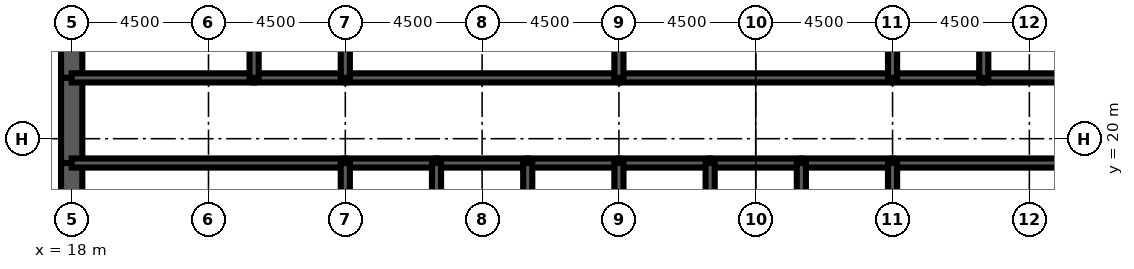
"""IFC4 building model, lengths in metres.
Left out: names, types, materials, properties, quantities, classifications, styles, units other than length and angle.
Written with IfcOpenShell. Run it as: python <this file> out.ifc"""

import sys

from ifc_helpers import new_model, si_unit, direction, frame, frame_2d, origin, place, context, subcontext, project, spatial, rectangle, extrude, element, fill, save


model = new_model("IFC4")
c1 = context("Model", 3, precision=1e-05, world=origin(), true_north=direction((0.0, 1.0)))
c2 = subcontext(c1, "Body", "Model", "MODEL_VIEW")
j1 = project(units=[si_unit("LENGTHUNIT", "METRE"), si_unit("PLANEANGLEUNIT", "RADIAN")], contexts=[c1])
p1 = place(None, origin())
s1 = spatial("IfcSite", under=j1, at=p1, CompositionType="ELEMENT")
p2 = place(p1, origin())
s2 = spatial("IfcBuilding", under=s1, at=p2, CompositionType="ELEMENT")
p3 = place(p2, frame((0.0, 0.0, 317.3)))
s3 = spatial("IfcBuildingStorey", under=s2, at=p3, CompositionType="ELEMENT", Elevation=317.3)
p4 = place(p3, frame((18.0, 26.0, 0.0), z_axis=(0.0, 0.0, 1.0), x_axis=(0.0, -1.0, 0.0)))
e1 = element("IfcWall", 1, at=p4, inside=s3, PredefinedType="SHEAR", context=c2, shape_type="SweptSolid", body=[
    extrude(rectangle(XDim=4.0, YDim=0.7, at=frame_2d((2.0, 0.0))), origin(), (0.0, 0.0, 1.0), 4.2),
])
p5 = place(p3, frame((18.0, 22.0, 0.0), z_axis=(0.0, 0.0, 1.0), x_axis=(0.0, -1.0, 0.0)))
e2 = element("IfcWall", 2, at=p5, inside=s3, PredefinedType="SHEAR", context=c2, shape_type="SweptSolid", body=[
    extrude(rectangle(XDim=2.8, YDim=0.7, at=frame_2d((1.4, 0.0))), origin(), (0.0, 0.0, 1.0), 4.2),
])
p6 = place(p5, frame((0.6, 0.0, 0.0)))
e3 = element("IfcOpeningElement", 3, at=p6, cuts=e2, PredefinedType="OPENING", context=c2, shape_type="SweptSolid", body=[
    extrude(rectangle(XDim=1.8, YDim=2.1, at=frame_2d((0.9, 1.05))), frame((0.0, 0.36, 0.0), z_axis=(0.0, -1.0, 0.0), x_axis=(1.0, 0.0, 0.0)), (0.0, 0.0, 1.0), 0.72),
])
p7 = place(p3, frame((18.0, 19.2, 0.0), z_axis=(0.0, 0.0, 1.0), x_axis=(0.0, -1.0, 0.0)))
e4 = element("IfcWall", 4, at=p7, inside=s3, PredefinedType="SHEAR", context=c2, shape_type="SweptSolid", body=[
    extrude(rectangle(XDim=3.2, YDim=0.7, at=frame_2d((1.6, 0.0))), origin(), (0.0, 0.0, 1.0), 4.2),
])
p8 = place(p3, frame((18.0, 19.2, 0.0), z_axis=(0.0, 0.0, 1.0), x_axis=(1.0, 0.0, 0.0)))
e5 = element("IfcWall", 5, at=p8, inside=s3, PredefinedType="SOLIDWALL", context=c2, shape_type="SweptSolid", body=[
    extrude(rectangle(XDim=9.0, YDim=0.3, at=frame_2d((4.5, 0.0))), origin(), (0.0, 0.0, 1.0), 4.2),
])
p9 = place(p8, frame((0.65, 0.0, 0.0)))
e6 = element("IfcOpeningElement", 6, at=p9, cuts=e5, PredefinedType="OPENING", context=c2, shape_type="SweptSolid", body=[
    extrude(rectangle(XDim=1.0, YDim=2.1, at=frame_2d((0.5, 1.05))), frame((0.0, 0.16, 0.0), z_axis=(0.0, -1.0, 0.0), x_axis=(1.0, 0.0, 0.0)), (0.0, 0.0, 1.0), 0.32),
])
p10 = place(p3, frame((27.0, 19.2, 0.0), z_axis=(0.0, 0.0, 1.0), x_axis=(1.0, 0.0, 0.0)))
e7 = element("IfcWall", 7, at=p10, inside=s3, PredefinedType="SOLIDWALL", context=c2, shape_type="SweptSolid", body=[
    extrude(rectangle(XDim=3.0, YDim=0.3, at=frame_2d((1.5, 0.0))), origin(), (0.0, 0.0, 1.0), 4.2),
])
p11 = place(p10, frame((0.95, 0.0, 0.0)))
e8 = element("IfcOpeningElement", 8, at=p11, cuts=e7, PredefinedType="OPENING", context=c2, shape_type="SweptSolid", body=[
    extrude(rectangle(XDim=1.1, YDim=2.2, at=frame_2d((0.55, 1.1))), frame((0.0, 0.16, 0.0), z_axis=(0.0, -1.0, 0.0), x_axis=(1.0, 0.0, 0.0)), (0.0, 0.0, 1.0), 0.32),
])
p12 = place(p3, frame((30.0, 19.2, 0.0), z_axis=(0.0, 0.0, 1.0), x_axis=(1.0, 0.0, 0.0)))
e9 = element("IfcWall", 9, at=p12, inside=s3, PredefinedType="SOLIDWALL", context=c2, shape_type="SweptSolid", body=[
    extrude(rectangle(XDim=3.0, YDim=0.3, at=frame_2d((1.5, 0.0))), origin(), (0.0, 0.0, 1.0), 4.2),
])
p13 = place(p12, frame((0.95, 0.0, 0.0)))
e10 = element("IfcOpeningElement", 10, at=p13, cuts=e9, PredefinedType="OPENING", context=c2, shape_type="SweptSolid", body=[
    extrude(rectangle(XDim=1.1, YDim=2.2, at=frame_2d((0.55, 1.1))), frame((0.0, 0.16, 0.0), z_axis=(0.0, -1.0, 0.0), x_axis=(1.0, 0.0, 0.0)), (0.0, 0.0, 1.0), 0.32),
])
p14 = place(p3, frame((33.0, 19.2, 0.0), z_axis=(0.0, 0.0, 1.0), x_axis=(1.0, 0.0, 0.0)))
e11 = element("IfcWall", 11, at=p14, inside=s3, PredefinedType="SOLIDWALL", context=c2, shape_type="SweptSolid", body=[
    extrude(rectangle(XDim=3.0, YDim=0.3, at=frame_2d((1.5, 0.0))), origin(), (0.0, 0.0, 1.0), 4.2),
])
p15 = place(p14, frame((0.95, 0.0, 0.0)))
e12 = element("IfcOpeningElement", 12, at=p15, cuts=e11, PredefinedType="OPENING", context=c2, shape_type="SweptSolid", body=[
    extrude(rectangle(XDim=1.1, YDim=2.2, at=frame_2d((0.55, 1.1))), frame((0.0, 0.16, 0.0), z_axis=(0.0, -1.0, 0.0), x_axis=(1.0, 0.0, 0.0)), (0.0, 0.0, 1.0), 0.32),
])
p16 = place(p3, frame((36.0, 19.2, 0.0), z_axis=(0.0, 0.0, 1.0), x_axis=(1.0, 0.0, 0.0)))
e13 = element("IfcWall", 13, at=p16, inside=s3, PredefinedType="SOLIDWALL", context=c2, shape_type="SweptSolid", body=[
    extrude(rectangle(XDim=3.0, YDim=0.3, at=frame_2d((1.5, 0.0))), origin(), (0.0, 0.0, 1.0), 4.2),
])
p17 = place(p16, frame((0.95, 0.0, 0.0)))
e14 = element("IfcOpeningElement", 14, at=p17, cuts=e13, PredefinedType="OPENING", context=c2, shape_type="SweptSolid", body=[
    extrude(rectangle(XDim=1.1, YDim=2.2, at=frame_2d((0.55, 1.1))), frame((0.0, 0.16, 0.0), z_axis=(0.0, -1.0, 0.0), x_axis=(1.0, 0.0, 0.0)), (0.0, 0.0, 1.0), 0.32),
])
p18 = place(p3, frame((39.0, 19.2, 0.0), z_axis=(0.0, 0.0, 1.0), x_axis=(1.0, 0.0, 0.0)))
e15 = element("IfcWall", 15, at=p18, inside=s3, PredefinedType="SOLIDWALL", context=c2, shape_type="SweptSolid", body=[
    extrude(rectangle(XDim=3.0, YDim=0.3, at=frame_2d((1.5, 0.0))), origin(), (0.0, 0.0, 1.0), 4.2),
])
p19 = place(p18, frame((1.0, 0.0, 0.0)))
e16 = element("IfcOpeningElement", 16, at=p19, cuts=e15, PredefinedType="OPENING", context=c2, shape_type="SweptSolid", body=[
    extrude(rectangle(XDim=1.0, YDim=2.1, at=frame_2d((0.5, 1.05))), frame((0.0, 0.16, 0.0), z_axis=(0.0, -1.0, 0.0), x_axis=(1.0, 0.0, 0.0)), (0.0, 0.0, 1.0), 0.32),
])
p20 = place(p3, frame((42.0, 19.2, 0.0), z_axis=(0.0, 0.0, 1.0), x_axis=(1.0, 0.0, 0.0)))
e17 = element("IfcWall", 17, at=p20, inside=s3, PredefinedType="SOLIDWALL", context=c2, shape_type="SweptSolid", body=[
    extrude(rectangle(XDim=3.0, YDim=0.3, at=frame_2d((1.5, 0.0))), origin(), (0.0, 0.0, 1.0), 4.2),
])
p21 = place(p20, frame((1.0, 0.0, 0.0)))
e18 = element("IfcOpeningElement", 18, at=p21, cuts=e17, PredefinedType="OPENING", context=c2, shape_type="SweptSolid", body=[
    extrude(rectangle(XDim=1.0, YDim=2.1, at=frame_2d((0.5, 1.05))), frame((0.0, 0.16, 0.0), z_axis=(0.0, -1.0, 0.0), x_axis=(1.0, 0.0, 0.0)), (0.0, 0.0, 1.0), 0.32),
])
p22 = place(p3, frame((45.0, 19.2, 0.0), z_axis=(0.0, 0.0, 1.0), x_axis=(1.0, 0.0, 0.0)))
e19 = element("IfcWall", 19, at=p22, inside=s3, PredefinedType="SOLIDWALL", context=c2, shape_type="SweptSolid", body=[
    extrude(rectangle(XDim=9.0, YDim=0.3, at=frame_2d((4.5, 0.0))), origin(), (0.0, 0.0, 1.0), 4.2),
])
p23 = place(p22, frame((7.35, 0.0, 0.0)))
e20 = element("IfcOpeningElement", 20, at=p23, cuts=e19, PredefinedType="OPENING", context=c2, shape_type="SweptSolid", body=[
    extrude(rectangle(XDim=1.0, YDim=2.1, at=frame_2d((0.5, 1.05))), frame((0.0, 0.16, 0.0), z_axis=(0.0, -1.0, 0.0), x_axis=(1.0, 0.0, 0.0)), (0.0, 0.0, 1.0), 0.32),
])
p24 = place(p3, frame((18.0, 22.0, 0.0), z_axis=(0.0, 0.0, 1.0), x_axis=(1.0, 0.0, 0.0)))
e21 = element("IfcWall", 21, at=p24, inside=s3, PredefinedType="SOLIDWALL", context=c2, shape_type="SweptSolid", body=[
    extrude(rectangle(XDim=6.0, YDim=0.3, at=frame_2d((3.0, 0.0))), origin(), (0.0, 0.0, 1.0), 4.2),
])
p25 = place(p24, frame((4.4, 0.0, 0.0)))
e22 = element("IfcOpeningElement", 22, at=p25, cuts=e21, PredefinedType="OPENING", context=c2, shape_type="SweptSolid", body=[
    extrude(rectangle(XDim=1.0, YDim=2.1, at=frame_2d((0.5, 1.05))), frame((0.0, 0.16, 0.0), z_axis=(0.0, -1.0, 0.0), x_axis=(1.0, 0.0, 0.0)), (0.0, 0.0, 1.0), 0.32),
])
p26 = place(p24, frame((0.9, 0.0, 0.0)))
e23 = element("IfcOpeningElement", 23, at=p26, cuts=e21, PredefinedType="OPENING", context=c2, shape_type="SweptSolid", body=[
    extrude(rectangle(XDim=1.0, YDim=2.1, at=frame_2d((0.5, 1.05))), frame((0.0, 0.16, 0.0), z_axis=(0.0, -1.0, 0.0), x_axis=(1.0, 0.0, 0.0)), (0.0, 0.0, 1.0), 0.32),
])
p27 = place(p3, frame((24.0, 22.0, 0.0), z_axis=(0.0, 0.0, 1.0), x_axis=(1.0, 0.0, 0.0)))
e24 = element("IfcWall", 24, at=p27, inside=s3, PredefinedType="SOLIDWALL", context=c2, shape_type="SweptSolid", body=[
    extrude(rectangle(XDim=3.0, YDim=0.3, at=frame_2d((1.5, 0.0))), origin(), (0.0, 0.0, 1.0), 4.2),
])
p28 = place(p27, frame((1.0, 0.0, 0.0)))
e25 = element("IfcOpeningElement", 25, at=p28, cuts=e24, PredefinedType="OPENING", context=c2, shape_type="SweptSolid", body=[
    extrude(rectangle(XDim=1.0, YDim=2.1, at=frame_2d((0.5, 1.05))), frame((0.0, 0.16, 0.0), z_axis=(0.0, -1.0, 0.0), x_axis=(1.0, 0.0, 0.0)), (0.0, 0.0, 1.0), 0.32),
])
p29 = place(p3, frame((27.0, 22.0, 0.0), z_axis=(0.0, 0.0, 1.0), x_axis=(1.0, 0.0, 0.0)))
e26 = element("IfcWall", 26, at=p29, inside=s3, PredefinedType="SOLIDWALL", context=c2, shape_type="SweptSolid", body=[
    extrude(rectangle(XDim=9.0, YDim=0.3, at=frame_2d((4.5, 0.0))), origin(), (0.0, 0.0, 1.0), 4.2),
])
p30 = place(p29, frame((4.0, 0.0, 0.0)))
e27 = element("IfcOpeningElement", 27, at=p30, cuts=e26, PredefinedType="OPENING", context=c2, shape_type="SweptSolid", body=[
    extrude(rectangle(XDim=1.0, YDim=2.1, at=frame_2d((0.5, 1.05))), frame((0.0, 0.16, 0.0), z_axis=(0.0, -1.0, 0.0), x_axis=(1.0, 0.0, 0.0)), (0.0, 0.0, 1.0), 0.32),
])
p31 = place(p3, frame((36.0, 22.0, 0.0), z_axis=(0.0, 0.0, 1.0), x_axis=(1.0, 0.0, 0.0)))
e28 = element("IfcWall", 28, at=p31, inside=s3, PredefinedType="SOLIDWALL", context=c2, shape_type="SweptSolid", body=[
    extrude(rectangle(XDim=9.0, YDim=0.3, at=frame_2d((4.5, 0.0))), origin(), (0.0, 0.0, 1.0), 4.2),
])
p32 = place(p31, frame((4.0, 0.0, 0.0)))
e29 = element("IfcOpeningElement", 29, at=p32, cuts=e28, PredefinedType="OPENING", context=c2, shape_type="SweptSolid", body=[
    extrude(rectangle(XDim=1.0, YDim=2.1, at=frame_2d((0.5, 1.05))), frame((0.0, 0.16, 0.0), z_axis=(0.0, -1.0, 0.0), x_axis=(1.0, 0.0, 0.0)), (0.0, 0.0, 1.0), 0.32),
])
p33 = place(p3, frame((45.0, 22.0, 0.0), z_axis=(0.0, 0.0, 1.0), x_axis=(1.0, 0.0, 0.0)))
e30 = element("IfcWall", 30, at=p33, inside=s3, PredefinedType="SOLIDWALL", context=c2, shape_type="SweptSolid", body=[
    extrude(rectangle(XDim=3.0, YDim=0.3, at=frame_2d((1.5, 0.0))), origin(), (0.0, 0.0, 1.0), 4.2),
])
p34 = place(p33, frame((1.0, 0.0, 0.0)))
e31 = element("IfcOpeningElement", 31, at=p34, cuts=e30, PredefinedType="OPENING", context=c2, shape_type="SweptSolid", body=[
    extrude(rectangle(XDim=1.0, YDim=2.1, at=frame_2d((0.5, 1.05))), frame((0.0, 0.16, 0.0), z_axis=(0.0, -1.0, 0.0), x_axis=(1.0, 0.0, 0.0)), (0.0, 0.0, 1.0), 0.32),
])
p35 = place(p3, frame((48.0, 22.0, 0.0), z_axis=(0.0, 0.0, 1.0), x_axis=(1.0, 0.0, 0.0)))
e32 = element("IfcWall", 32, at=p35, inside=s3, PredefinedType="SOLIDWALL", context=c2, shape_type="SweptSolid", body=[
    extrude(rectangle(XDim=6.0, YDim=0.3, at=frame_2d((3.0, 0.0))), origin(), (0.0, 0.0, 1.0), 4.2),
])
p36 = place(p35, frame((2.0, 0.0, 0.0)))
e33 = element("IfcOpeningElement", 33, at=p36, cuts=e32, PredefinedType="OPENING", context=c2, shape_type="SweptSolid", body=[
    extrude(rectangle(XDim=1.0, YDim=2.1, at=frame_2d((0.5, 1.05))), frame((0.0, 0.16, 0.0), z_axis=(0.0, -1.0, 0.0), x_axis=(1.0, 0.0, 0.0)), (0.0, 0.0, 1.0), 0.32),
])
p37 = place(p35, frame((4.1, 0.0, 0.0)))
e34 = element("IfcOpeningElement", 34, at=p37, cuts=e32, PredefinedType="OPENING", context=c2, shape_type="SweptSolid", body=[
    extrude(rectangle(XDim=1.0, YDim=2.1, at=frame_2d((0.5, 1.05))), frame((0.0, 0.16, 0.0), z_axis=(0.0, -1.0, 0.0), x_axis=(1.0, 0.0, 0.0)), (0.0, 0.0, 1.0), 0.32),
])
for number, where, z_axis, x_axis in (
    (35, (27.0, 16.0, 0.0), (0.0, 0.0, 1.0), (0.0, 1.0, 0.0)),
    (36, (30.0, 16.0, 0.0), (0.0, 0.0, 1.0), (0.0, 1.0, 0.0)),
    (37, (33.0, 16.0, 0.0), (0.0, 0.0, 1.0), (0.0, 1.0, 0.0)),
    (38, (36.0, 16.0, 0.0), (0.0, 0.0, 1.0), (0.0, 1.0, 0.0)),
    (39, (39.0, 16.0, 0.0), (0.0, 0.0, 1.0), (0.0, 1.0, 0.0)),
    (40, (42.0, 16.0, 0.0), (0.0, 0.0, 1.0), (0.0, 1.0, 0.0)),
    (41, (45.0, 16.0, 0.0), (0.0, 0.0, 1.0), (0.0, 1.0, 0.0)),
):
    element("IfcWall", number, at=place(p3, frame(where, z_axis=z_axis, x_axis=x_axis)), inside=s3, PredefinedType="SOLIDWALL", context=c2, shape_type="SweptSolid", body=[
        extrude(rectangle(XDim=3.2, YDim=0.3, at=frame_2d((1.6, 0.0))), origin(), (0.0, 0.0, 1.0), 4.2),
    ])
for number, where, z_axis, x_axis in (
    (42, (24.0, 22.0, 0.0), (0.0, 0.0, 1.0), (0.0, 1.0, 0.0)),
    (43, (27.0, 22.0, 0.0), (0.0, 0.0, 1.0), (0.0, 1.0, 0.0)),
    (44, (36.0, 22.0, 0.0), (0.0, 0.0, 1.0), (0.0, 1.0, 0.0)),
    (45, (45.0, 22.0, 0.0), (0.0, 0.0, 1.0), (0.0, 1.0, 0.0)),
    (46, (48.0, 22.0, 0.0), (0.0, 0.0, 1.0), (0.0, 1.0, 0.0)),
):
    element("IfcWall", number, at=place(p3, frame(where, z_axis=z_axis, x_axis=x_axis)), inside=s3, PredefinedType="SOLIDWALL", context=c2, shape_type="SweptSolid", body=[
        extrude(rectangle(XDim=4.0, YDim=0.3, at=frame_2d((2.0, 0.0))), origin(), (0.0, 0.0, 1.0), 4.2),
    ])
p38 = place(p3, frame((39.0, 22.15, 0.0), z_axis=(0.0, 0.0, 1.0), x_axis=(0.0, 1.0, 0.0)))
e47 = element("IfcWall", 47, at=p38, inside=s3, PredefinedType="PARTITIONING", context=c2, shape_type="SweptSolid", body=[
    extrude(rectangle(XDim=3.7, YDim=0.15, at=frame_2d((1.85, 0.0))), origin(), (0.0, 0.0, 1.0), 3.0),
])
p39 = place(p38, frame((2.2, 0.0, 0.0)))
e48 = element("IfcOpeningElement", 48, at=p39, cuts=e47, PredefinedType="OPENING", context=c2, shape_type="SweptSolid", body=[
    extrude(rectangle(XDim=1.0, YDim=2.1, at=frame_2d((0.5, 1.05))), frame((0.0, 0.085, 0.0), z_axis=(0.0, -1.0, 0.0), x_axis=(1.0, 0.0, 0.0)), (0.0, 0.0, 1.0), 0.17),
])
p40 = place(p3, frame((20.525, 22.15, 0.0), z_axis=(0.0, 0.0, 1.0), x_axis=(0.0, 1.0, 0.0)))
e49 = element("IfcWall", 49, at=p40, inside=s3, PredefinedType="PARTITIONING", context=c2, shape_type="SweptSolid", body=[
    extrude(rectangle(XDim=3.7, YDim=0.15, at=frame_2d((1.85, 0.0))), origin(), (0.0, 0.0, 1.0), 3.0),
])
p41 = place(p3, frame((49.4, 19.35, 0.0), z_axis=(0.0, 0.0, 1.0), x_axis=(0.0, 1.0, 0.0)))
e50 = element("IfcWall", 50, at=p41, inside=s3, PredefinedType="PARTITIONING", context=c2, shape_type="SweptSolid", body=[
    extrude(rectangle(XDim=2.5, YDim=0.15, at=frame_2d((1.25, 0.0))), origin(), (0.0, 0.0, 1.0), 3.0),
])
p42 = place(p41, frame((1.15, 0.0, 0.0)))
e51 = element("IfcOpeningElement", 51, at=p42, cuts=e50, PredefinedType="OPENING", context=c2, shape_type="SweptSolid", body=[
    extrude(rectangle(XDim=1.0, YDim=2.1, at=frame_2d((0.5, 1.05))), frame((0.0, 0.085, 0.0), z_axis=(0.0, -1.0, 0.0), x_axis=(1.0, 0.0, 0.0)), (0.0, 0.0, 1.0), 0.17),
])
p43 = place(p42, origin())
e52 = element("IfcDoor", 52, at=p43, inside=s3, OperationType="SINGLE_SWING_RIGHT", PredefinedType="DOOR", context=c2, shape_type="SweptSolid", body=[
    extrude(rectangle(XDim=1.0, YDim=2.1, at=frame_2d((0.5, 1.05))), frame((0.0, 0.025, 0.0), z_axis=(0.0, -1.0, 0.0), x_axis=(1.0, 0.0, 0.0)), (0.0, 0.0, 1.0), 0.05),
])
fill(e51, e52)
p44 = place(p11, origin())
e53 = element("IfcDoor", 53, at=p44, inside=s3, OperationType="DOUBLE_DOOR_SLIDING", PredefinedType="USERDEFINED", context=c2, shape_type="SweptSolid", body=[
    extrude(rectangle(XDim=1.1, YDim=2.2, at=frame_2d((0.55, 1.1))), frame((0.0, 0.025, 0.0), z_axis=(0.0, -1.0, 0.0), x_axis=(1.0, 0.0, 0.0)), (0.0, 0.0, 1.0), 0.05),
])
fill(e8, e53)
p45 = place(p13, origin())
e54 = element("IfcDoor", 54, at=p45, inside=s3, OperationType="DOUBLE_DOOR_SLIDING", PredefinedType="USERDEFINED", context=c2, shape_type="SweptSolid", body=[
    extrude(rectangle(XDim=1.1, YDim=2.2, at=frame_2d((0.55, 1.1))), frame((0.0, 0.025, 0.0), z_axis=(0.0, -1.0, 0.0), x_axis=(1.0, 0.0, 0.0)), (0.0, 0.0, 1.0), 0.05),
])
fill(e10, e54)
p46 = place(p15, origin())
e55 = element("IfcDoor", 55, at=p46, inside=s3, OperationType="DOUBLE_DOOR_SLIDING", PredefinedType="USERDEFINED", context=c2, shape_type="SweptSolid", body=[
    extrude(rectangle(XDim=1.1, YDim=2.2, at=frame_2d((0.55, 1.1))), frame((0.0, 0.025, 0.0), z_axis=(0.0, -1.0, 0.0), x_axis=(1.0, 0.0, 0.0)), (0.0, 0.0, 1.0), 0.05),
])
fill(e12, e55)
p47 = place(p17, origin())
e56 = element("IfcDoor", 56, at=p47, inside=s3, OperationType="DOUBLE_DOOR_SLIDING", PredefinedType="USERDEFINED", context=c2, shape_type="SweptSolid", body=[
    extrude(rectangle(XDim=1.1, YDim=2.2, at=frame_2d((0.55, 1.1))), frame((0.0, 0.025, 0.0), z_axis=(0.0, -1.0, 0.0), x_axis=(1.0, 0.0, 0.0)), (0.0, 0.0, 1.0), 0.05),
])
fill(e14, e56)
p48 = place(p9, origin())
e57 = element("IfcDoor", 57, at=p48, inside=s3, OperationType="SINGLE_SWING_LEFT", PredefinedType="DOOR", context=c2, shape_type="SweptSolid", body=[
    extrude(rectangle(XDim=1.0, YDim=2.1, at=frame_2d((0.5, 1.05))), frame((0.0, 0.025, 0.0), z_axis=(0.0, -1.0, 0.0), x_axis=(1.0, 0.0, 0.0)), (0.0, 0.0, 1.0), 0.05),
])
fill(e6, e57)
p49 = place(p6, origin())
e58 = element("IfcDoor", 58, at=p49, inside=s3, OperationType="SINGLE_SWING_LEFT", PredefinedType="DOOR", context=c2, shape_type="SweptSolid", body=[
    extrude(rectangle(XDim=1.8, YDim=2.1, at=frame_2d((0.9, 1.05))), frame((0.0, 0.35, 0.0), z_axis=(0.0, -1.0, 0.0), x_axis=(1.0, 0.0, 0.0)), (0.0, 0.0, 1.0), 0.699),
])
fill(e3, e58)
p50 = place(p25, origin())
e59 = element("IfcDoor", 59, at=p50, inside=s3, OperationType="SINGLE_SWING_RIGHT", PredefinedType="DOOR", context=c2, shape_type="SweptSolid", body=[
    extrude(rectangle(XDim=1.0, YDim=2.1, at=frame_2d((0.5, 1.05))), frame((0.0, 0.025, 0.0), z_axis=(0.0, -1.0, 0.0), x_axis=(1.0, 0.0, 0.0)), (0.0, 0.0, 1.0), 0.05),
])
fill(e22, e59)
p51 = place(p28, origin())
e60 = element("IfcDoor", 60, at=p51, inside=s3, OperationType="SINGLE_SWING_LEFT", PredefinedType="DOOR", context=c2, shape_type="SweptSolid", body=[
    extrude(rectangle(XDim=1.0, YDim=2.1, at=frame_2d((0.5, 1.05))), frame((0.0, 0.025, 0.0), z_axis=(0.0, -1.0, 0.0), x_axis=(1.0, 0.0, 0.0)), (0.0, 0.0, 1.0), 0.05),
])
fill(e25, e60)
p52 = place(p30, origin())
e61 = element("IfcDoor", 61, at=p52, inside=s3, OperationType="SINGLE_SWING_LEFT", PredefinedType="DOOR", context=c2, shape_type="SweptSolid", body=[
    extrude(rectangle(XDim=1.0, YDim=2.1, at=frame_2d((0.5, 1.05))), frame((0.0, 0.025, 0.0), z_axis=(0.0, -1.0, 0.0), x_axis=(1.0, 0.0, 0.0)), (0.0, 0.0, 1.0), 0.05),
])
fill(e27, e61)
p53 = place(p32, origin())
e62 = element("IfcDoor", 62, at=p53, inside=s3, OperationType="SINGLE_SWING_LEFT", PredefinedType="DOOR", context=c2, shape_type="SweptSolid", body=[
    extrude(rectangle(XDim=1.0, YDim=2.1, at=frame_2d((0.5, 1.05))), frame((0.0, 0.025, 0.0), z_axis=(0.0, -1.0, 0.0), x_axis=(1.0, 0.0, 0.0)), (0.0, 0.0, 1.0), 0.05),
])
fill(e29, e62)
p54 = place(p34, origin())
e63 = element("IfcDoor", 63, at=p54, inside=s3, OperationType="SINGLE_SWING_LEFT", PredefinedType="DOOR", context=c2, shape_type="SweptSolid", body=[
    extrude(rectangle(XDim=1.0, YDim=2.1, at=frame_2d((0.5, 1.05))), frame((0.0, 0.025, 0.0), z_axis=(0.0, -1.0, 0.0), x_axis=(1.0, 0.0, 0.0)), (0.0, 0.0, 1.0), 0.05),
])
fill(e31, e63)
p55 = place(p36, origin())
e64 = element("IfcDoor", 64, at=p55, inside=s3, OperationType="SINGLE_SWING_LEFT", PredefinedType="DOOR", context=c2, shape_type="SweptSolid", body=[
    extrude(rectangle(XDim=1.0, YDim=2.1, at=frame_2d((0.5, 1.05))), frame((0.0, 0.025, 0.0), z_axis=(0.0, -1.0, 0.0), x_axis=(1.0, 0.0, 0.0)), (0.0, 0.0, 1.0), 0.05),
])
fill(e33, e64)
p56 = place(p26, origin())
e65 = element("IfcDoor", 65, at=p56, inside=s3, OperationType="SINGLE_SWING_LEFT", PredefinedType="DOOR", context=c2, shape_type="SweptSolid", body=[
    extrude(rectangle(XDim=1.0, YDim=2.1, at=frame_2d((0.5, 1.05))), frame((0.0, 0.025, 0.0), z_axis=(0.0, -1.0, 0.0), x_axis=(1.0, 0.0, 0.0)), (0.0, 0.0, 1.0), 0.05),
])
fill(e23, e65)
p57 = place(p19, origin())
e66 = element("IfcDoor", 66, at=p57, inside=s3, OperationType="SINGLE_SWING_LEFT", PredefinedType="DOOR", context=c2, shape_type="SweptSolid", body=[
    extrude(rectangle(XDim=1.0, YDim=2.1, at=frame_2d((0.5, 1.05))), frame((0.0, 0.025, 0.0), z_axis=(0.0, -1.0, 0.0), x_axis=(1.0, 0.0, 0.0)), (0.0, 0.0, 1.0), 0.05),
])
fill(e16, e66)
p58 = place(p21, origin())
e67 = element("IfcDoor", 67, at=p58, inside=s3, OperationType="SINGLE_SWING_LEFT", PredefinedType="DOOR", context=c2, shape_type="SweptSolid", body=[
    extrude(rectangle(XDim=1.0, YDim=2.1, at=frame_2d((0.5, 1.05))), frame((0.0, 0.025, 0.0), z_axis=(0.0, -1.0, 0.0), x_axis=(1.0, 0.0, 0.0)), (0.0, 0.0, 1.0), 0.05),
])
fill(e18, e67)
save(model, sys.argv[1])
